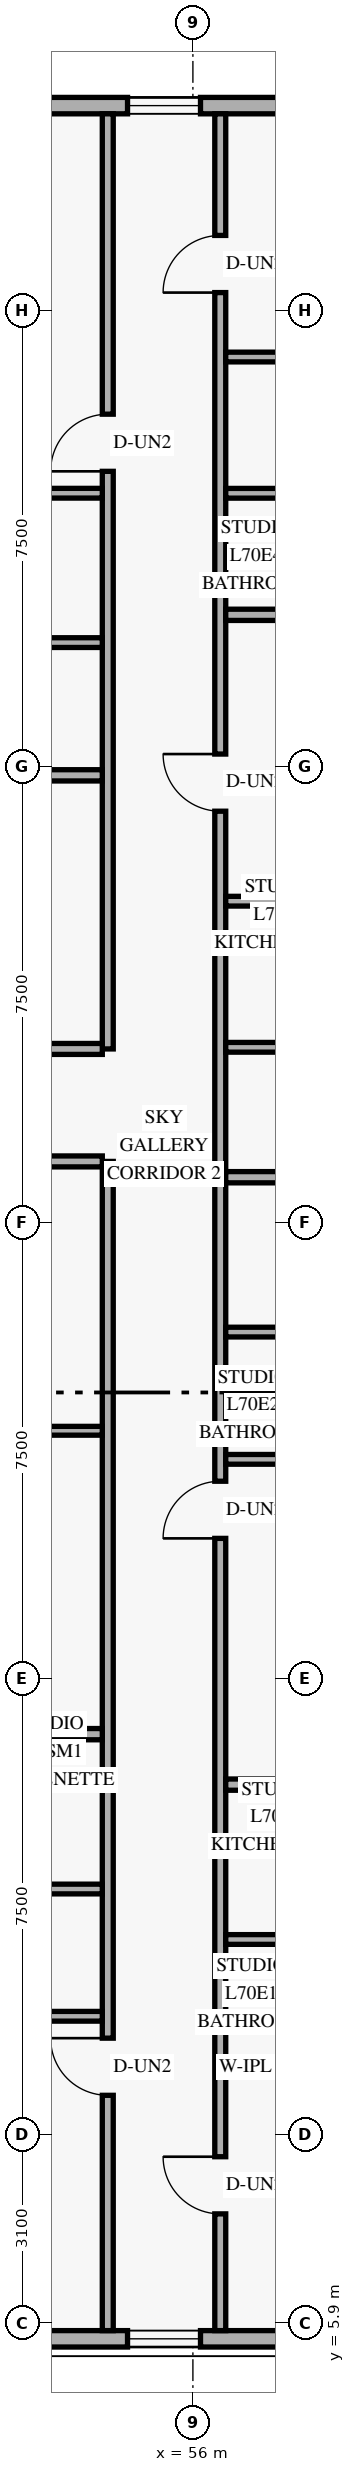
"""IFC4 building model, lengths in metres.
Left out: names, types, materials, properties, quantities, classifications, styles, units other than length and angle.
Written with IfcOpenShell. Run it as: python <this file> out.ifc"""

import sys

from ifc_helpers import new_model, si_unit, direction, frame, frame_2d, origin, place, context, subcontext, project, spatial, rectangle, extrude, element, fill, save


model = new_model("IFC4")
c1 = context("Model", 3, precision=1e-05, world=origin(), true_north=direction((0.0, 1.0)))
c2 = subcontext(c1, "Body", "Model", "MODEL_VIEW")
j1 = project(units=[si_unit("LENGTHUNIT", "METRE"), si_unit("PLANEANGLEUNIT", "RADIAN")], contexts=[c1])
p1 = place(None, origin())
s1 = spatial("IfcSite", under=j1, at=p1, CompositionType="ELEMENT")
p2 = place(p1, origin())
s2 = spatial("IfcBuilding", under=s1, at=p2, CompositionType="ELEMENT")
p3 = place(p2, frame((0.0, 0.0, 267.6)))
s3 = spatial("IfcBuildingStorey", under=s2, at=p3, CompositionType="ELEMENT", Elevation=267.6)
p4 = place(p3, frame((25.82, 5.635, 0.0), z_axis=(0.0, 0.0, 1.0), x_axis=(1.0, 0.0, 0.0)))
e1 = element("IfcWall", 1, at=p4, inside=s3, PredefinedType="SOLIDWALL", context=c2, shape_type="SweptSolid", body=[
    extrude(rectangle(XDim=32.96, YDim=0.27, at=frame_2d((16.48, 0.0))), origin(), (0.0, 0.0, 1.0), 3.36),
])
p5 = place(p4, frame((14.438, 0.0, 0.85)))
e2 = element("IfcOpeningElement", 2, at=p5, cuts=e1, PredefinedType="OPENING", context=c2, shape_type="SweptSolid", body=[
    extrude(rectangle(XDim=1.2, YDim=1.5, at=frame_2d((0.6, 0.75))), frame((0.0, 0.145, 0.0), z_axis=(0.0, -1.0, 0.0), x_axis=(1.0, 0.0, 0.0)), (0.0, 0.0, 1.0), 0.29),
])
p6 = place(p4, frame((25.782, 0.0, 0.85)))
e3 = element("IfcOpeningElement", 3, at=p6, cuts=e1, PredefinedType="OPENING", context=c2, shape_type="SweptSolid", body=[
    extrude(rectangle(XDim=1.2, YDim=1.5, at=frame_2d((0.6, 0.75))), frame((0.0, 0.145, 0.0), z_axis=(0.0, -1.0, 0.0), x_axis=(1.0, 0.0, 0.0)), (0.0, 0.0, 1.0), 0.29),
])
p7 = place(p4, frame((29.105, 0.0, 0.85)))
e4 = element("IfcOpeningElement", 4, at=p7, cuts=e1, PredefinedType="OPENING", context=c2, shape_type="SweptSolid", body=[
    extrude(rectangle(XDim=1.2, YDim=1.5, at=frame_2d((0.6, 0.75))), frame((0.0, 0.145, 0.0), z_axis=(0.0, -1.0, 0.0), x_axis=(1.0, 0.0, 0.0)), (0.0, 0.0, 1.0), 0.29),
])
p8 = place(p3, frame((58.78, 42.365, 0.0), z_axis=(0.0, 0.0, 1.0), x_axis=(-1.0, 0.0, 0.0)))
e5 = element("IfcWall", 5, at=p8, inside=s3, PredefinedType="SOLIDWALL", context=c2, shape_type="SweptSolid", body=[
    extrude(rectangle(XDim=32.96, YDim=0.27, at=frame_2d((16.48, 0.0))), origin(), (0.0, 0.0, 1.0), 3.36),
])
p9 = place(p8, frame((27.89, 0.0, 0.85)))
e6 = element("IfcOpeningElement", 6, at=p9, cuts=e5, PredefinedType="OPENING", context=c2, shape_type="SweptSolid", body=[
    extrude(rectangle(XDim=1.2, YDim=1.5, at=frame_2d((0.6, 0.75))), frame((0.0, 0.145, 0.0), z_axis=(0.0, -1.0, 0.0), x_axis=(1.0, 0.0, 0.0)), (0.0, 0.0, 1.0), 0.29),
])
p10 = place(p8, frame((14.667, 0.0, 0.85)))
e7 = element("IfcOpeningElement", 7, at=p10, cuts=e5, PredefinedType="OPENING", context=c2, shape_type="SweptSolid", body=[
    extrude(rectangle(XDim=1.2, YDim=1.5, at=frame_2d((0.6, 0.75))), frame((0.0, 0.145, 0.0), z_axis=(0.0, -1.0, 0.0), x_axis=(1.0, 0.0, 0.0)), (0.0, 0.0, 1.0), 0.29),
])
p11 = place(p8, frame((2.655, 0.0, 0.85)))
e8 = element("IfcOpeningElement", 8, at=p11, cuts=e5, PredefinedType="OPENING", context=c2, shape_type="SweptSolid", body=[
    extrude(rectangle(XDim=1.2, YDim=1.5, at=frame_2d((0.6, 0.75))), frame((0.0, 0.145, 0.0), z_axis=(0.0, -1.0, 0.0), x_axis=(1.0, 0.0, 0.0)), (0.0, 0.0, 1.0), 0.29),
])
p12 = place(p3, frame((54.6, 5.77, 0.0), z_axis=(0.0, 0.0, 1.0), x_axis=(0.0, 1.0, 0.0)))
e9 = element("IfcWall", 9, at=p12, inside=s3, PredefinedType="STANDARD", context=c2, shape_type="SweptSolid", body=[
    extrude(rectangle(XDim=19.23, YDim=0.18, at=frame_2d((9.615, 0.0))), origin(), (0.0, 0.0, 1.0), 2.803),
])
p13 = place(p12, frame((3.87, 0.0, 0.0)))
e10 = element("IfcOpeningElement", 10, at=p13, cuts=e9, PredefinedType="OPENING", context=c2, shape_type="SweptSolid", body=[
    extrude(rectangle(XDim=0.94, YDim=2.15, at=frame_2d((0.47, 1.075))), frame((0.0, 0.1, 0.0), z_axis=(0.0, -1.0, 0.0), x_axis=(1.0, 0.0, 0.0)), (0.0, 0.0, 1.0), 0.2),
])
p14 = place(p3, frame((54.6, 26.85, 0.0), z_axis=(0.0, 0.0, 1.0), x_axis=(0.0, 1.0, 0.0)))
e11 = element("IfcWall", 11, at=p14, inside=s3, PredefinedType="STANDARD", context=c2, shape_type="SweptSolid", body=[
    extrude(rectangle(XDim=15.38, YDim=0.18, at=frame_2d((7.69, 0.0))), origin(), (0.0, 0.0, 1.0), 2.803),
])
p15 = place(p14, frame((9.5, 0.0, 0.0)))
e12 = element("IfcOpeningElement", 12, at=p15, cuts=e11, PredefinedType="OPENING", context=c2, shape_type="SweptSolid", body=[
    extrude(rectangle(XDim=0.94, YDim=2.15, at=frame_2d((0.47, 1.075))), frame((0.0, 0.1, 0.0), z_axis=(0.0, -1.0, 0.0), x_axis=(1.0, 0.0, 0.0)), (0.0, 0.0, 1.0), 0.2),
])
p16 = place(p3, frame((37.64, 25.0, 0.0), z_axis=(0.0, 0.0, 1.0), x_axis=(1.0, 0.0, 0.0)))
e13 = element("IfcWall", 13, at=p16, inside=s3, PredefinedType="STANDARD", context=c2, shape_type="SweptSolid", body=[
    extrude(rectangle(XDim=16.87, YDim=0.18, at=frame_2d((8.435, 0.0))), origin(), (0.0, 0.0, 1.0), 2.803),
])
p17 = place(p16, frame((0.32, 0.0, 0.0)))
e14 = element("IfcOpeningElement", 14, at=p17, cuts=e13, PredefinedType="OPENING", context=c2, shape_type="SweptSolid", body=[
    extrude(rectangle(XDim=0.94, YDim=2.15, at=frame_2d((0.47, 1.075))), frame((0.0, 0.1, 0.0), z_axis=(0.0, -1.0, 0.0), x_axis=(1.0, 0.0, 0.0)), (0.0, 0.0, 1.0), 0.2),
])
p18 = place(p3, frame((37.64, 26.85, 0.0), z_axis=(0.0, 0.0, 1.0), x_axis=(1.0, 0.0, 0.0)))
e15 = element("IfcWall", 15, at=p18, inside=s3, PredefinedType="STANDARD", context=c2, shape_type="SweptSolid", body=[
    extrude(rectangle(XDim=16.87, YDim=0.18, at=frame_2d((8.435, 0.0))), origin(), (0.0, 0.0, 1.0), 2.803),
])
p19 = place(p18, frame((7.975, 0.0, 0.0)))
e16 = element("IfcOpeningElement", 16, at=p19, cuts=e15, PredefinedType="OPENING", context=c2, shape_type="SweptSolid", body=[
    extrude(rectangle(XDim=0.94, YDim=2.15, at=frame_2d((0.47, 1.075))), frame((0.0, 0.1, 0.0), z_axis=(0.0, -1.0, 0.0), x_axis=(1.0, 0.0, 0.0)), (0.0, 0.0, 1.0), 0.2),
])
p20 = place(p3, frame((56.45, 5.77, 0.0), z_axis=(0.0, 0.0, 1.0), x_axis=(0.0, 1.0, 0.0)))
e17 = element("IfcWall", 17, at=p20, inside=s3, PredefinedType="STANDARD", context=c2, shape_type="SweptSolid", body=[
    extrude(rectangle(XDim=36.46, YDim=0.18, at=frame_2d((18.23, 0.0))), origin(), (0.0, 0.0, 1.0), 2.803),
])
p21 = place(p20, frame((1.92, 0.0, 0.0)))
e18 = element("IfcOpeningElement", 18, at=p21, cuts=e17, PredefinedType="OPENING", context=c2, shape_type="SweptSolid", body=[
    extrude(rectangle(XDim=0.94, YDim=2.15, at=frame_2d((0.47, 1.075))), frame((0.0, 0.1, 0.0), z_axis=(0.0, -1.0, 0.0), x_axis=(1.0, 0.0, 0.0)), (0.0, 0.0, 1.0), 0.2),
])
p22 = place(p20, frame((13.03, 0.0, 0.0)))
e19 = element("IfcOpeningElement", 19, at=p22, cuts=e17, PredefinedType="OPENING", context=c2, shape_type="SweptSolid", body=[
    extrude(rectangle(XDim=0.94, YDim=2.15, at=frame_2d((0.47, 1.075))), frame((0.0, 0.1, 0.0), z_axis=(0.0, -1.0, 0.0), x_axis=(1.0, 0.0, 0.0)), (0.0, 0.0, 1.0), 0.2),
])
p23 = place(p20, frame((24.99, 0.0, 0.0)))
e20 = element("IfcOpeningElement", 20, at=p23, cuts=e17, PredefinedType="OPENING", context=c2, shape_type="SweptSolid", body=[
    extrude(rectangle(XDim=0.94, YDim=2.15, at=frame_2d((0.47, 1.075))), frame((0.0, 0.1, 0.0), z_axis=(0.0, -1.0, 0.0), x_axis=(1.0, 0.0, 0.0)), (0.0, 0.0, 1.0), 0.2),
])
p24 = place(p20, frame((33.52, 0.0, 0.0)))
e21 = element("IfcOpeningElement", 21, at=p24, cuts=e17, PredefinedType="OPENING", context=c2, shape_type="SweptSolid", body=[
    extrude(rectangle(XDim=0.94, YDim=2.15, at=frame_2d((0.47, 1.075))), frame((0.0, 0.1, 0.0), z_axis=(0.0, -1.0, 0.0), x_axis=(1.0, 0.0, 0.0)), (0.0, 0.0, 1.0), 0.2),
])
p25 = place(p3, frame((56.54, 10.11, 0.0), z_axis=(0.0, 0.0, 1.0), x_axis=(1.0, 0.0, 0.0)))
e22 = element("IfcWall", 22, at=p25, inside=s3, PredefinedType="PLUMBINGWALL", context=c2, shape_type="SweptSolid", body=[
    extrude(rectangle(XDim=2.606, YDim=0.16, at=frame_2d((1.303, 0.0))), origin(), (0.0, 0.0, 1.0), 2.879),
])
p26 = place(p3, frame((56.54, 12.203, 0.0), z_axis=(0.0, 0.0, 1.0), x_axis=(1.0, 0.0, 0.0)))
e23 = element("IfcWall", 23, at=p26, inside=s3, PredefinedType="PLUMBINGWALL", context=c2, shape_type="SweptSolid", body=[
    extrude(rectangle(XDim=2.446, YDim=0.16, at=frame_2d((1.223, 0.0))), origin(), (0.0, 0.0, 1.0), 2.879),
])
p27 = place(p3, frame((56.54, 14.75, 0.0), z_axis=(0.0, 0.0, 1.0), x_axis=(1.0, 0.0, 0.0)))
e24 = element("IfcWall", 24, at=p27, inside=s3, PredefinedType="PARTITIONING", context=c2, shape_type="SweptSolid", body=[
    extrude(rectangle(XDim=5.59, YDim=0.185, at=frame_2d((2.795, 0.0))), origin(), (0.0, 0.0, 1.0), 2.879),
])
p28 = place(p3, frame((56.54, 20.1, 0.0), z_axis=(0.0, 0.0, 1.0), x_axis=(1.0, 0.0, 0.0)))
e25 = element("IfcWall", 25, at=p28, inside=s3, PredefinedType="PLUMBINGWALL", context=c2, shape_type="SweptSolid", body=[
    extrude(rectangle(XDim=2.682, YDim=0.16, at=frame_2d((1.341, 0.0))), origin(), (0.0, 0.0, 1.0), 2.879),
])
p29 = place(p3, frame((56.54, 22.193, 0.0), z_axis=(0.0, 0.0, 1.0), x_axis=(1.0, 0.0, 0.0)))
e26 = element("IfcWall", 26, at=p29, inside=s3, PredefinedType="PLUMBINGWALL", context=c2, shape_type="SweptSolid", body=[
    extrude(rectangle(XDim=2.522, YDim=0.16, at=frame_2d((1.261, 0.0))), origin(), (0.0, 0.0, 1.0), 2.879),
])
p30 = place(p3, frame((56.54, 24.74, 0.0), z_axis=(0.0, 0.0, 1.0), x_axis=(1.0, 0.0, 0.0)))
e27 = element("IfcWall", 27, at=p30, inside=s3, PredefinedType="PARTITIONING", context=c2, shape_type="SweptSolid", body=[
    extrude(rectangle(XDim=5.59, YDim=0.185, at=frame_2d((2.795, 0.0))), origin(), (0.0, 0.0, 1.0), 2.879),
])
p31 = place(p3, frame((56.54, 29.28, 0.0), z_axis=(0.0, 0.0, 1.0), x_axis=(1.0, 0.0, 0.0)))
e28 = element("IfcWall", 28, at=p31, inside=s3, PredefinedType="PLUMBINGWALL", context=c2, shape_type="SweptSolid", body=[
    extrude(rectangle(XDim=2.758, YDim=0.16, at=frame_2d((1.379, 0.0))), origin(), (0.0, 0.0, 1.0), 2.879),
])
p32 = place(p3, frame((56.54, 26.877, 0.0), z_axis=(0.0, 0.0, 1.0), x_axis=(1.0, 0.0, 0.0)))
e29 = element("IfcWall", 29, at=p32, inside=s3, PredefinedType="PLUMBINGWALL", context=c2, shape_type="SweptSolid", body=[
    extrude(rectangle(XDim=2.598, YDim=0.16, at=frame_2d((1.299, 0.0))), origin(), (0.0, 0.0, 1.0), 2.879),
])
p33 = place(p3, frame((56.54, 33.99, 0.0), z_axis=(0.0, 0.0, 1.0), x_axis=(1.0, 0.0, 0.0)))
e30 = element("IfcWall", 30, at=p33, inside=s3, PredefinedType="PARTITIONING", context=c2, shape_type="SweptSolid", body=[
    extrude(rectangle(XDim=5.59, YDim=0.185, at=frame_2d((2.795, 0.0))), origin(), (0.0, 0.0, 1.0), 2.879),
])
p34 = place(p3, frame((56.54, 38.23, 0.0), z_axis=(0.0, 0.0, 1.0), x_axis=(1.0, 0.0, 0.0)))
e31 = element("IfcWall", 31, at=p34, inside=s3, PredefinedType="PLUMBINGWALL", context=c2, shape_type="SweptSolid", body=[
    extrude(rectangle(XDim=2.834, YDim=0.16, at=frame_2d((1.417, 0.0))), origin(), (0.0, 0.0, 1.0), 2.879),
])
p35 = place(p3, frame((56.54, 35.989, 0.0), z_axis=(0.0, 0.0, 1.0), x_axis=(1.0, 0.0, 0.0)))
e32 = element("IfcWall", 32, at=p35, inside=s3, PredefinedType="PLUMBINGWALL", context=c2, shape_type="SweptSolid", body=[
    extrude(rectangle(XDim=2.674, YDim=0.16, at=frame_2d((1.337, 0.0))), origin(), (0.0, 0.0, 1.0), 2.879),
])
p36 = place(p3, frame((37.64, 15.58, 0.0), z_axis=(0.0, 0.0, 1.0), x_axis=(1.0, 0.0, 0.0)))
e33 = element("IfcWall", 33, at=p36, inside=s3, PredefinedType="PARTITIONING", context=c2, shape_type="SweptSolid", body=[
    extrude(rectangle(XDim=16.87, YDim=0.185, at=frame_2d((8.435, 0.0))), origin(), (0.0, 0.0, 1.0), 2.803),
])
p37 = place(p3, frame((51.98, 10.94, 0.0), z_axis=(0.0, 0.0, 1.0), x_axis=(1.0, 0.0, 0.0)))
e34 = element("IfcWall", 34, at=p37, inside=s3, PredefinedType="PLUMBINGWALL", context=c2, shape_type="SweptSolid", body=[
    extrude(rectangle(XDim=2.53, YDim=0.16, at=frame_2d((1.265, 0.0))), origin(), (0.0, 0.0, 1.0), 3.36),
])
p38 = place(p3, frame((52.14, 13.033, 0.0), z_axis=(0.0, 0.0, 1.0), x_axis=(1.0, 0.0, 0.0)))
e35 = element("IfcWall", 35, at=p38, inside=s3, PredefinedType="PLUMBINGWALL", context=c2, shape_type="SweptSolid", body=[
    extrude(rectangle(XDim=2.37, YDim=0.16, at=frame_2d((1.185, 0.0))), origin(), (0.0, 0.0, 1.0), 3.36),
])
p39 = place(p3, frame((51.29, 20.57, 0.0), z_axis=(0.0, 0.0, 1.0), x_axis=(1.0, 0.0, 0.0)))
e36 = element("IfcWall", 36, at=p39, inside=s3, PredefinedType="PARTITIONING", context=c2, shape_type="SweptSolid", body=[
    extrude(rectangle(XDim=3.22, YDim=0.145, at=frame_2d((1.61, 0.0))), origin(), (0.0, 0.0, 1.0), 3.36),
])
p40 = place(p3, frame((38.173, 31.35, 0.0), z_axis=(0.0, 0.0, 1.0), x_axis=(1.0, 0.0, 0.0)))
e37 = element("IfcWall", 37, at=p40, inside=s3, PredefinedType="PARTITIONING", context=c2, shape_type="SweptSolid", body=[
    extrude(rectangle(XDim=16.337, YDim=0.185, at=frame_2d((8.169, 0.0))), origin(), (0.0, 0.0, 1.0), 2.803),
])
p41 = place(p3, frame((51.904, 35.99, 0.0), z_axis=(0.0, 0.0, 1.0), x_axis=(1.0, 0.0, 0.0)))
e38 = element("IfcWall", 38, at=p41, inside=s3, PredefinedType="PLUMBINGWALL", context=c2, shape_type="SweptSolid", body=[
    extrude(rectangle(XDim=2.606, YDim=0.16, at=frame_2d((1.303, 0.0))), origin(), (0.0, 0.0, 1.0), 3.36),
])
p42 = place(p3, frame((52.064, 33.533, 0.0), z_axis=(0.0, 0.0, 1.0), x_axis=(1.0, 0.0, 0.0)))
e39 = element("IfcWall", 39, at=p42, inside=s3, PredefinedType="PLUMBINGWALL", context=c2, shape_type="SweptSolid", body=[
    extrude(rectangle(XDim=2.446, YDim=0.16, at=frame_2d((1.223, 0.0))), origin(), (0.0, 0.0, 1.0), 3.36),
])
p43 = place(p7, origin())
e40 = element("IfcWindow", 40, at=p43, inside=s3, PartitioningType="SINGLE_PANEL", PredefinedType="WINDOW", context=c2, shape_type="SweptSolid", body=[
    extrude(rectangle(XDim=1.2, YDim=1.5, at=frame_2d((0.6, 0.75))), frame((0.0, 0.03, 0.0), z_axis=(0.0, -1.0, 0.0), x_axis=(1.0, 0.0, 0.0)), (0.0, 0.0, 1.0), 0.06),
])
fill(e4, e40)
p44 = place(p11, origin())
e41 = element("IfcWindow", 41, at=p44, inside=s3, PartitioningType="SINGLE_PANEL", PredefinedType="WINDOW", context=c2, shape_type="SweptSolid", body=[
    extrude(rectangle(XDim=1.2, YDim=1.5, at=frame_2d((0.6, 0.75))), frame((0.0, 0.03, 0.0), z_axis=(0.0, -1.0, 0.0), x_axis=(1.0, 0.0, 0.0)), (0.0, 0.0, 1.0), 0.06),
])
fill(e8, e41)
p45 = place(p21, origin())
e42 = element("IfcDoor", 42, at=p45, inside=s3, OperationType="SINGLE_SWING_RIGHT", PredefinedType="DOOR", context=c2, shape_type="SweptSolid", body=[
    extrude(rectangle(XDim=0.94, YDim=2.15, at=frame_2d((0.47, 1.075))), frame((0.0, 0.025, 0.0), z_axis=(0.0, -1.0, 0.0), x_axis=(1.0, 0.0, 0.0)), (0.0, 0.0, 1.0), 0.05),
])
fill(e18, e42)
p46 = place(p22, origin())
e43 = element("IfcDoor", 43, at=p46, inside=s3, OperationType="SINGLE_SWING_LEFT", PredefinedType="DOOR", context=c2, shape_type="SweptSolid", body=[
    extrude(rectangle(XDim=0.94, YDim=2.15, at=frame_2d((0.47, 1.075))), frame((0.0, 0.025, 0.0), z_axis=(0.0, -1.0, 0.0), x_axis=(1.0, 0.0, 0.0)), (0.0, 0.0, 1.0), 0.05),
])
fill(e19, e43)
p47 = place(p23, origin())
e44 = element("IfcDoor", 44, at=p47, inside=s3, OperationType="SINGLE_SWING_RIGHT", PredefinedType="DOOR", context=c2, shape_type="SweptSolid", body=[
    extrude(rectangle(XDim=0.94, YDim=2.15, at=frame_2d((0.47, 1.075))), frame((0.0, 0.025, 0.0), z_axis=(0.0, -1.0, 0.0), x_axis=(1.0, 0.0, 0.0)), (0.0, 0.0, 1.0), 0.05),
])
fill(e20, e44)
p48 = place(p24, origin())
e45 = element("IfcDoor", 45, at=p48, inside=s3, OperationType="SINGLE_SWING_LEFT", PredefinedType="DOOR", context=c2, shape_type="SweptSolid", body=[
    extrude(rectangle(XDim=0.94, YDim=2.15, at=frame_2d((0.47, 1.075))), frame((0.0, 0.025, 0.0), z_axis=(0.0, -1.0, 0.0), x_axis=(1.0, 0.0, 0.0)), (0.0, 0.0, 1.0), 0.05),
])
fill(e21, e45)
p49 = place(p13, origin())
e46 = element("IfcDoor", 46, at=p49, inside=s3, OperationType="SINGLE_SWING_RIGHT", PredefinedType="DOOR", context=c2, shape_type="SweptSolid", body=[
    extrude(rectangle(XDim=0.94, YDim=2.15, at=frame_2d((0.47, 1.075))), frame((0.0, 0.025, 0.0), z_axis=(0.0, -1.0, 0.0), x_axis=(1.0, 0.0, 0.0)), (0.0, 0.0, 1.0), 0.05),
])
fill(e10, e46)
p50 = place(p15, origin())
e47 = element("IfcDoor", 47, at=p50, inside=s3, OperationType="SINGLE_SWING_LEFT", PredefinedType="DOOR", context=c2, shape_type="SweptSolid", body=[
    extrude(rectangle(XDim=0.94, YDim=2.15, at=frame_2d((0.47, 1.075))), frame((0.0, 0.025, 0.0), z_axis=(0.0, -1.0, 0.0), x_axis=(1.0, 0.0, 0.0)), (0.0, 0.0, 1.0), 0.05),
])
fill(e12, e47)
save(model, sys.argv[1])
